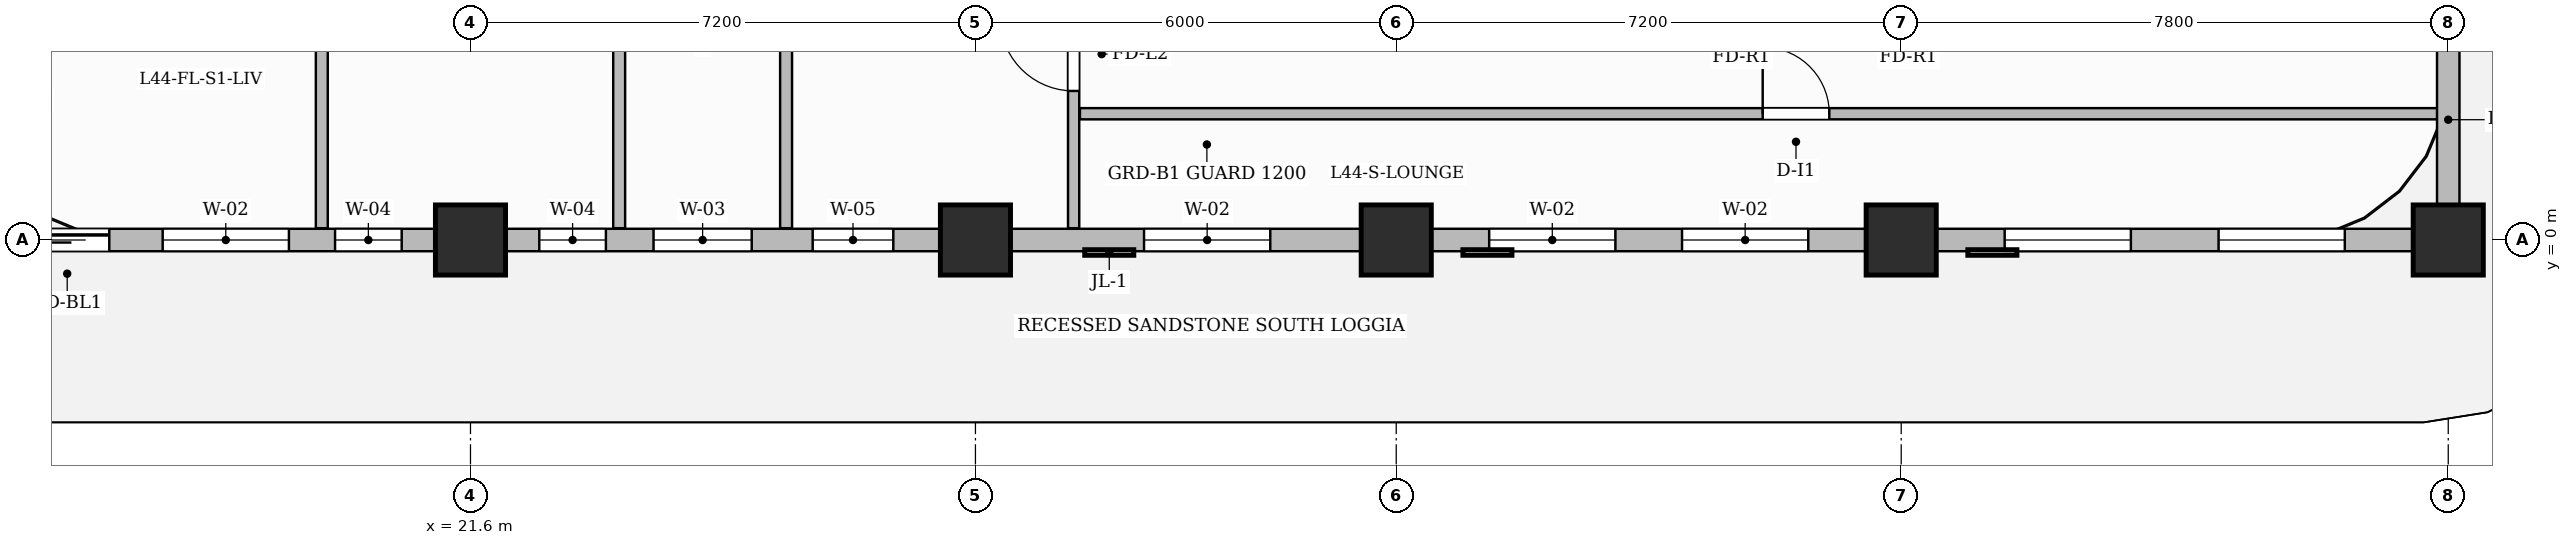
"""IFC4 building model, lengths in metres.
Left out: names, types, materials, properties, quantities, classifications, styles, units other than length and angle.
Written with IfcOpenShell. Run it as: python <this file> out.ifc"""

import sys

from ifc_helpers import new_model, si_unit, direction, frame, frame_2d, origin, origin_2d, place, context, subcontext, project, spatial, rectangle, extrude, source, transform, mapped, element, fill, save


model = new_model("IFC4")
c1 = context("Model", 3, precision=1e-05, world=origin(), true_north=direction((0.0, 1.0)))
c2 = subcontext(c1, "Body", "Model", "MODEL_VIEW")
j1 = project(units=[si_unit("LENGTHUNIT", "METRE"), si_unit("PLANEANGLEUNIT", "RADIAN")], contexts=[c1])
p1 = place(None, origin())
s1 = spatial("IfcSite", under=j1, at=p1, CompositionType="ELEMENT")
p2 = place(p1, origin())
s2 = spatial("IfcBuilding", under=s1, at=p2, CompositionType="ELEMENT")
p3 = place(p2, frame((0.0, 0.0, 177.25)))
s3 = spatial("IfcBuildingStorey", under=s2, at=p3, CompositionType="ELEMENT", Elevation=177.25)
m1 = source(origin(), c2, "Body", "SweptSolid", [
    extrude(rectangle(XDim=1.0, YDim=1.0, at=origin_2d()), origin(), (0.0, 0.0, 1.0), 3.85),
])
for number, where, z_axis, x_axis in (
    (1, (21.6, 0.0, 0.0), (0.0, 0.0, 1.0), (1.0, 0.0, 0.0)),
    (2, (28.8, 0.0, 0.0), (0.0, 0.0, 1.0), (1.0, 0.0, 0.0)),
    (3, (34.8, 0.0, 0.0), (0.0, 0.0, 1.0), (1.0, 0.0, 0.0)),
    (4, (42.0, 0.0, 0.0), (0.0, 0.0, 1.0), (1.0, 0.0, 0.0)),
    (5, (49.8, 0.0, 0.0), (0.0, 0.0, 1.0), (1.0, 0.0, 0.0)),
):
    element("IfcColumn", number, at=place(p3, frame(where, z_axis=z_axis, x_axis=x_axis)), inside=s3, PredefinedType="COLUMN", context=c2, shape_type="MappedRepresentation", body=[
        mapped(m1, transform((0.0, 0.0, 0.0), scale=1.0)),
    ])
p4 = place(p3, frame((30.2, 0.168, 0.0), z_axis=(0.0, 0.0, 1.0), x_axis=(0.0, 1.0, 0.0)))
e6 = element("IfcWall", 6, at=p4, inside=s3, PredefinedType="PARTITIONING", context=c2, shape_type="SweptSolid", body=[
    extrude(rectangle(XDim=9.492, YDim=0.16, at=frame_2d((4.746, 0.0))), origin(), (0.0, 0.0, 1.0), 3.6),
])
p5 = place(p4, frame((1.957, 0.0, 0.0)))
e7 = element("IfcOpeningElement", 7, at=p5, cuts=e6, PredefinedType="OPENING", context=c2, shape_type="SweptSolid", body=[
    extrude(rectangle(XDim=1.05, YDim=2.15, at=frame_2d((0.525, 1.075))), frame((0.0, 0.09, 0.0), z_axis=(0.0, -1.0, 0.0), x_axis=(1.0, 0.0, 0.0)), (0.0, 0.0, 1.0), 0.18),
])
p6 = place(p3, frame((30.29, 1.8, 0.0), z_axis=(0.0, 0.0, 1.0), x_axis=(1.0, 0.0, 0.0)))
e8 = element("IfcWall", 8, at=p6, inside=s3, PredefinedType="PARTITIONING", context=c2, shape_type="SweptSolid", body=[
    extrude(rectangle(XDim=19.37, YDim=0.16, at=frame_2d((9.685, 0.0))), origin(), (0.0, 0.0, 1.0), 3.6),
])
p7 = place(p6, frame((9.735, 0.0, 0.0)))
e9 = element("IfcOpeningElement", 9, at=p7, cuts=e8, PredefinedType="OPENING", context=c2, shape_type="SweptSolid", body=[
    extrude(rectangle(XDim=0.95, YDim=2.15, at=frame_2d((0.475, 1.075))), frame((0.0, 0.09, 0.0), z_axis=(0.0, -1.0, 0.0), x_axis=(1.0, 0.0, 0.0)), (0.0, 0.0, 1.0), 0.18),
])
p8 = place(p3, frame((19.48, 0.168, 0.0), z_axis=(0.0, 0.0, 1.0), x_axis=(0.0, 1.0, 0.0)))
e10 = element("IfcWall", 10, at=p8, inside=s3, PredefinedType="PARTITIONING", context=c2, shape_type="SweptSolid", body=[
    extrude(rectangle(XDim=9.492, YDim=0.17, at=frame_2d((4.746, 0.0))), origin(), (0.0, 0.0, 1.0), 3.6),
])
p9 = place(p8, frame((8.032, 0.0, 0.0)))
e11 = element("IfcOpeningElement", 11, at=p9, cuts=e10, PredefinedType="OPENING", context=c2, shape_type="SweptSolid", body=[
    extrude(rectangle(XDim=0.95, YDim=2.15, at=frame_2d((0.475, 1.075))), frame((0.0, 0.095, 0.0), z_axis=(0.0, -1.0, 0.0), x_axis=(1.0, 0.0, 0.0)), (0.0, 0.0, 1.0), 0.19),
])
for number, where, z_axis, x_axis in (
    (12, (23.72, 0.168, 0.0), (0.0, 0.0, 1.0), (0.0, 1.0, 0.0)),
    (13, (26.1, 0.168, 0.0), (0.0, 0.0, 1.0), (0.0, 1.0, 0.0)),
):
    element("IfcWall", number, at=place(p3, frame(where, z_axis=z_axis, x_axis=x_axis)), inside=s3, PredefinedType="PARTITIONING", context=c2, shape_type="SweptSolid", body=[
        extrude(rectangle(XDim=7.342, YDim=0.17, at=frame_2d((3.671, 0.0))), origin(), (0.0, 0.0, 1.0), 3.6),
    ])
p10 = place(p3, frame((14.4, 0.0, 0.0), z_axis=(0.0, 0.0, 1.0), x_axis=(1.0, 0.0, 0.0)))
e14 = element("IfcWall", 14, at=p10, inside=s3, PredefinedType="SOLIDWALL", context=c2, shape_type="SweptSolid", body=[
    extrude(rectangle(XDim=35.4, YDim=0.32, at=frame_2d((17.7, 0.0))), origin(), (0.0, 0.0, 1.0), 3.085),
])
p11 = place(p10, frame((0.85, 0.0, 0.0)))
e15 = element("IfcOpeningElement", 15, at=p11, cuts=e14, PredefinedType="OPENING", context=c2, shape_type="SweptSolid", body=[
    extrude(rectangle(XDim=1.2, YDim=2.2, at=frame_2d((0.6, 1.1))), frame((0.0, 0.17, 0.0), z_axis=(0.0, -1.0, 0.0), x_axis=(1.0, 0.0, 0.0)), (0.0, 0.0, 1.0), 0.34),
])
p12 = place(p10, frame((2.811, 0.0, 0.8)))
e16 = element("IfcOpeningElement", 16, at=p12, cuts=e14, PredefinedType="OPENING", context=c2, shape_type="SweptSolid", body=[
    extrude(rectangle(XDim=1.8, YDim=1.85, at=frame_2d((0.9, 0.925))), frame((0.0, 0.17, 0.0), z_axis=(0.0, -1.0, 0.0), x_axis=(1.0, 0.0, 0.0)), (0.0, 0.0, 1.0), 0.34),
])
p13 = place(p10, frame((5.269, 0.0, 0.8)))
e17 = element("IfcOpeningElement", 17, at=p13, cuts=e14, PredefinedType="OPENING", context=c2, shape_type="SweptSolid", body=[
    extrude(rectangle(XDim=0.95, YDim=1.75, at=frame_2d((0.475, 0.875))), frame((0.0, 0.17, 0.0), z_axis=(0.0, -1.0, 0.0), x_axis=(1.0, 0.0, 0.0)), (0.0, 0.0, 1.0), 0.34),
])
p14 = place(p10, frame((8.181, 0.0, 0.8)))
e18 = element("IfcOpeningElement", 18, at=p14, cuts=e14, PredefinedType="OPENING", context=c2, shape_type="SweptSolid", body=[
    extrude(rectangle(XDim=0.95, YDim=1.75, at=frame_2d((0.475, 0.875))), frame((0.0, 0.17, 0.0), z_axis=(0.0, -1.0, 0.0), x_axis=(1.0, 0.0, 0.0)), (0.0, 0.0, 1.0), 0.34),
])
p15 = place(p10, frame((9.81, 0.0, 0.8)))
e19 = element("IfcOpeningElement", 19, at=p15, cuts=e14, PredefinedType="OPENING", context=c2, shape_type="SweptSolid", body=[
    extrude(rectangle(XDim=1.4, YDim=1.85, at=frame_2d((0.7, 0.925))), frame((0.0, 0.17, 0.0), z_axis=(0.0, -1.0, 0.0), x_axis=(1.0, 0.0, 0.0)), (0.0, 0.0, 1.0), 0.34),
])
p16 = place(p10, frame((12.079, 0.0, 0.8)))
e20 = element("IfcOpeningElement", 20, at=p16, cuts=e14, PredefinedType="OPENING", context=c2, shape_type="SweptSolid", body=[
    extrude(rectangle(XDim=1.15, YDim=1.8, at=frame_2d((0.575, 0.9))), frame((0.0, 0.17, 0.0), z_axis=(0.0, -1.0, 0.0), x_axis=(1.0, 0.0, 0.0)), (0.0, 0.0, 1.0), 0.34),
])
p17 = place(p10, frame((16.804, 0.0, 0.8)))
e21 = element("IfcOpeningElement", 21, at=p17, cuts=e14, PredefinedType="OPENING", context=c2, shape_type="SweptSolid", body=[
    extrude(rectangle(XDim=1.8, YDim=1.85, at=frame_2d((0.9, 0.925))), frame((0.0, 0.17, 0.0), z_axis=(0.0, -1.0, 0.0), x_axis=(1.0, 0.0, 0.0)), (0.0, 0.0, 1.0), 0.34),
])
p18 = place(p10, frame((21.725, 0.0, 0.8)))
e22 = element("IfcOpeningElement", 22, at=p18, cuts=e14, PredefinedType="OPENING", context=c2, shape_type="SweptSolid", body=[
    extrude(rectangle(XDim=1.8, YDim=1.85, at=frame_2d((0.9, 0.925))), frame((0.0, 0.17, 0.0), z_axis=(0.0, -1.0, 0.0), x_axis=(1.0, 0.0, 0.0)), (0.0, 0.0, 1.0), 0.34),
])
p19 = place(p10, frame((24.475, 0.0, 0.8)))
e23 = element("IfcOpeningElement", 23, at=p19, cuts=e14, PredefinedType="OPENING", context=c2, shape_type="SweptSolid", body=[
    extrude(rectangle(XDim=1.8, YDim=1.85, at=frame_2d((0.9, 0.925))), frame((0.0, 0.17, 0.0), z_axis=(0.0, -1.0, 0.0), x_axis=(1.0, 0.0, 0.0)), (0.0, 0.0, 1.0), 0.34),
])
p20 = place(p10, frame((29.075, 0.0, 0.8)))
e24 = element("IfcOpeningElement", 24, at=p20, cuts=e14, PredefinedType="OPENING", context=c2, shape_type="SweptSolid", body=[
    extrude(rectangle(XDim=1.8, YDim=1.85, at=frame_2d((0.9, 0.925))), frame((0.0, 0.17, 0.0), z_axis=(0.0, -1.0, 0.0), x_axis=(1.0, 0.0, 0.0)), (0.0, 0.0, 1.0), 0.34),
])
p21 = place(p10, frame((32.125, 0.0, 0.8)))
e25 = element("IfcOpeningElement", 25, at=p21, cuts=e14, PredefinedType="OPENING", context=c2, shape_type="SweptSolid", body=[
    extrude(rectangle(XDim=1.8, YDim=1.85, at=frame_2d((0.9, 0.925))), frame((0.0, 0.17, 0.0), z_axis=(0.0, -1.0, 0.0), x_axis=(1.0, 0.0, 0.0)), (0.0, 0.0, 1.0), 0.34),
])
p22 = place(p3, frame((49.8, 0.05, 0.0), z_axis=(0.0, 0.0, 1.0), x_axis=(0.0, 1.0, 0.0)))
e26 = element("IfcWall", 26, at=p22, inside=s3, PredefinedType="SOLIDWALL", context=c2, shape_type="SweptSolid", body=[
    extrude(rectangle(XDim=3.33, YDim=0.32, at=frame_2d((1.665, 0.0))), origin(), (0.0, 0.0, 1.0), 3.6),
])
m2 = source(origin(), c2, "Body", "SweptSolid", [
    extrude(rectangle(XDim=1.05, YDim=2.15, at=frame_2d((0.525, 1.075))), frame((0.0, 0.025, 0.0), z_axis=(0.0, -1.0, 0.0), x_axis=(1.0, 0.0, 0.0)), (0.0, 0.0, 1.0), 0.05),
])
p23 = place(p5, origin())
e27 = element("IfcDoor", 27, at=p23, inside=s3, OperationType="SINGLE_SWING_RIGHT", PredefinedType="DOOR", context=c2, shape_type="MappedRepresentation", body=[
    mapped(m2, transform((0.0, 0.0, 0.0), scale=1.0)),
])
fill(e7, e27)
m3 = source(origin(), c2, "Body", "SweptSolid", [
    extrude(rectangle(XDim=0.95, YDim=2.15, at=frame_2d((0.475, 1.075))), frame((0.0, 0.025, 0.0), z_axis=(0.0, -1.0, 0.0), x_axis=(1.0, 0.0, 0.0)), (0.0, 0.0, 1.0), 0.05),
])
p24 = place(p7, origin())
e28 = element("IfcDoor", 28, at=p24, inside=s3, OperationType="SINGLE_SWING_LEFT", PredefinedType="DOOR", context=c2, shape_type="MappedRepresentation", body=[
    mapped(m3, transform((0.0, 0.0, 0.0), scale=1.0)),
])
fill(e9, e28)
m4 = source(origin(), c2, "Body", "SweptSolid", [
    extrude(rectangle(XDim=1.2, YDim=2.2, at=frame_2d((0.6, 1.1))), frame((0.0, 0.025, 0.0), z_axis=(0.0, -1.0, 0.0), x_axis=(1.0, 0.0, 0.0)), (0.0, 0.0, 1.0), 0.05),
])
p25 = place(p11, origin())
e29 = element("IfcDoor", 29, at=p25, inside=s3, OperationType="SLIDING_TO_LEFT", PredefinedType="DOOR", context=c2, shape_type="MappedRepresentation", body=[
    mapped(m4, transform((0.0, 0.0, 0.0), scale=1.0)),
])
fill(e15, e29)
m5 = source(origin(), c2, "Body", "SweptSolid", [
    extrude(rectangle(XDim=1.8, YDim=1.85, at=frame_2d((0.9, 0.925))), frame((0.0, 0.03, 0.0), z_axis=(0.0, -1.0, 0.0), x_axis=(1.0, 0.0, 0.0)), (0.0, 0.0, 1.0), 0.06),
])
p26 = place(p12, origin())
e30 = element("IfcWindow", 30, at=p26, inside=s3, PartitioningType="DOUBLE_PANEL_VERTICAL", PredefinedType="WINDOW", context=c2, shape_type="MappedRepresentation", body=[
    mapped(m5, transform((0.0, 0.0, 0.0), scale=1.0)),
])
fill(e16, e30)
m6 = source(origin(), c2, "Body", "SweptSolid", [
    extrude(rectangle(XDim=0.95, YDim=1.75, at=frame_2d((0.475, 0.875))), frame((0.0, 0.03, 0.0), z_axis=(0.0, -1.0, 0.0), x_axis=(1.0, 0.0, 0.0)), (0.0, 0.0, 1.0), 0.06),
])
p27 = place(p13, origin())
e31 = element("IfcWindow", 31, at=p27, inside=s3, PartitioningType="SINGLE_PANEL", PredefinedType="WINDOW", context=c2, shape_type="MappedRepresentation", body=[
    mapped(m6, transform((0.0, 0.0, 0.0), scale=1.0)),
])
fill(e17, e31)
p28 = place(p14, origin())
e32 = element("IfcWindow", 32, at=p28, inside=s3, PartitioningType="SINGLE_PANEL", PredefinedType="WINDOW", context=c2, shape_type="MappedRepresentation", body=[
    mapped(m6, transform((0.0, 0.0, 0.0), scale=1.0)),
])
fill(e18, e32)
m7 = source(origin(), c2, "Body", "SweptSolid", [
    extrude(rectangle(XDim=1.4, YDim=1.85, at=frame_2d((0.7, 0.925))), frame((0.0, 0.03, 0.0), z_axis=(0.0, -1.0, 0.0), x_axis=(1.0, 0.0, 0.0)), (0.0, 0.0, 1.0), 0.06),
])
p29 = place(p15, origin())
e33 = element("IfcWindow", 33, at=p29, inside=s3, PartitioningType="SINGLE_PANEL", PredefinedType="WINDOW", context=c2, shape_type="MappedRepresentation", body=[
    mapped(m7, transform((0.0, 0.0, 0.0), scale=1.0)),
])
fill(e19, e33)
m8 = source(origin(), c2, "Body", "SweptSolid", [
    extrude(rectangle(XDim=1.15, YDim=1.8, at=frame_2d((0.575, 0.9))), frame((0.0, 0.03, 0.0), z_axis=(0.0, -1.0, 0.0), x_axis=(1.0, 0.0, 0.0)), (0.0, 0.0, 1.0), 0.06),
])
p30 = place(p16, origin())
e34 = element("IfcWindow", 34, at=p30, inside=s3, PartitioningType="SINGLE_PANEL", PredefinedType="WINDOW", context=c2, shape_type="MappedRepresentation", body=[
    mapped(m8, transform((0.0, 0.0, 0.0), scale=1.0)),
])
fill(e20, e34)
p31 = place(p17, origin())
e35 = element("IfcWindow", 35, at=p31, inside=s3, PartitioningType="DOUBLE_PANEL_VERTICAL", PredefinedType="WINDOW", context=c2, shape_type="MappedRepresentation", body=[
    mapped(m5, transform((0.0, 0.0, 0.0), scale=1.0)),
])
fill(e21, e35)
p32 = place(p18, origin())
e36 = element("IfcWindow", 36, at=p32, inside=s3, PartitioningType="DOUBLE_PANEL_VERTICAL", PredefinedType="WINDOW", context=c2, shape_type="MappedRepresentation", body=[
    mapped(m5, transform((0.0, 0.0, 0.0), scale=1.0)),
])
fill(e22, e36)
p33 = place(p19, origin())
e37 = element("IfcWindow", 37, at=p33, inside=s3, PartitioningType="DOUBLE_PANEL_VERTICAL", PredefinedType="WINDOW", context=c2, shape_type="MappedRepresentation", body=[
    mapped(m5, transform((0.0, 0.0, 0.0), scale=1.0)),
])
fill(e23, e37)
p34 = place(p20, origin())
e38 = element("IfcWindow", 38, at=p34, inside=s3, PartitioningType="DOUBLE_PANEL_VERTICAL", PredefinedType="WINDOW", context=c2, shape_type="MappedRepresentation", body=[
    mapped(m5, transform((0.0, 0.0, 0.0), scale=1.0)),
])
fill(e24, e38)
p35 = place(p21, origin())
e39 = element("IfcWindow", 39, at=p35, inside=s3, PartitioningType="DOUBLE_PANEL_VERTICAL", PredefinedType="WINDOW", context=c2, shape_type="MappedRepresentation", body=[
    mapped(m5, transform((0.0, 0.0, 0.0), scale=1.0)),
])
fill(e25, e39)
save(model, sys.argv[1])
